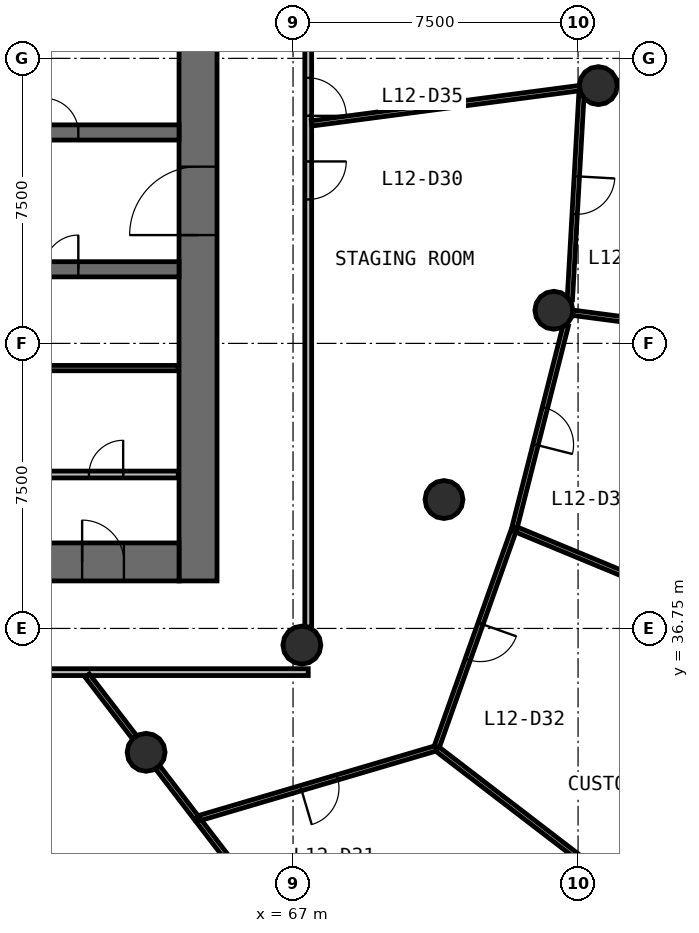
"""IFC4 building model, lengths in metres.
Left out: names, types, materials, properties, quantities, classifications, styles, units other than length and angle.
Written with IfcOpenShell. Run it as: python <this file> out.ifc"""

import sys

from ifc_helpers import new_model, si_unit, direction, frame, frame_2d, origin, origin_2d, place, context, subcontext, project, spatial, rectangle, circle, extrude, source, transform, mapped, element, fill, save


model = new_model("IFC4")
c1 = context("Model", 3, precision=1e-05, world=origin(), true_north=direction((0.0, 1.0)))
c2 = subcontext(c1, "Body", "Model", "MODEL_VIEW")
j1 = project(units=[si_unit("LENGTHUNIT", "METRE"), si_unit("PLANEANGLEUNIT", "RADIAN")], contexts=[c1])
p1 = place(None, origin())
s1 = spatial("IfcSite", under=j1, at=p1, CompositionType="ELEMENT")
p2 = place(p1, origin())
s2 = spatial("IfcBuilding", under=s1, at=p2, CompositionType="ELEMENT")
p3 = place(p2, frame((0.0, 0.0, 53.4)))
s3 = spatial("IfcBuildingStorey", under=s2, at=p3, CompositionType="ELEMENT", Elevation=53.4)
p4 = place(p3, frame((64.5, 38.0, 0.0), z_axis=(0.0, 0.0, 1.0), x_axis=(0.0, 1.0, 0.0)))
e1 = element("IfcWall", 1, at=p4, inside=s3, PredefinedType="SHEAR", context=c2, shape_type="SweptSolid", body=[
    extrude(rectangle(XDim=20.0, YDim=1.0, at=frame_2d((10.0, 0.0))), origin(), (0.0, 0.0, 1.0), 4.4),
])
p5 = place(p4, frame((9.1, 0.0, 0.0)))
e2 = element("IfcOpeningElement", 2, at=p5, cuts=e1, PredefinedType="OPENING", context=c2, shape_type="SweptSolid", body=[
    extrude(rectangle(XDim=1.8, YDim=2.1, at=frame_2d((0.9, 1.05))), frame((0.0, 0.51, 0.0), z_axis=(0.0, -1.0, 0.0), x_axis=(1.0, 0.0, 0.0)), (0.0, 0.0, 1.0), 1.02),
])
p6 = place(p3, frame((40.0, 38.5, 0.0), z_axis=(0.0, 0.0, 1.0), x_axis=(1.0, 0.0, 0.0)))
e3 = element("IfcWall", 3, at=p6, inside=s3, PredefinedType="SHEAR", context=c2, shape_type="SweptSolid", body=[
    extrude(rectangle(XDim=24.0, YDim=1.0, at=frame_2d((12.0, 0.0))), origin(), (0.0, 0.0, 1.0), 4.4),
])
p7 = place(p6, frame((21.45, 0.0, 0.0)))
e4 = element("IfcOpeningElement", 4, at=p7, cuts=e3, PredefinedType="OPENING", context=c2, shape_type="SweptSolid", body=[
    extrude(rectangle(XDim=1.1, YDim=2.1, at=frame_2d((0.55, 1.05))), frame((0.0, 0.51, 0.0), z_axis=(0.0, -1.0, 0.0), x_axis=(1.0, 0.0, 0.0)), (0.0, 0.0, 1.0), 1.02),
])
p8 = place(p6, frame((1.95, 0.0, 0.0)))
e5 = element("IfcOpeningElement", 5, at=p8, cuts=e3, PredefinedType="OPENING", context=c2, shape_type="SweptSolid", body=[
    extrude(rectangle(XDim=1.1, YDim=2.1, at=frame_2d((0.55, 1.05))), frame((0.0, 0.51, 0.0), z_axis=(0.0, -1.0, 0.0), x_axis=(1.0, 0.0, 0.0)), (0.0, 0.0, 1.0), 1.02),
])
p9 = place(p3, frame((40.0, 49.8, 0.0), z_axis=(0.0, 0.0, 1.0), x_axis=(1.0, 0.0, 0.0)))
e6 = element("IfcWall", 6, at=p9, inside=s3, PredefinedType="SHEAR", context=c2, shape_type="SweptSolid", body=[
    extrude(rectangle(XDim=24.0, YDim=0.4, at=frame_2d((12.0, 0.0))), origin(), (0.0, 0.0, 1.0), 4.4),
])
p10 = place(p9, frame((4.5, 0.0, 0.0)))
e7 = element("IfcOpeningElement", 7, at=p10, cuts=e6, PredefinedType="OPENING", context=c2, shape_type="SweptSolid", body=[
    extrude(rectangle(XDim=1.1, YDim=2.1, at=frame_2d((0.55, 1.05))), frame((0.0, 0.21, 0.0), z_axis=(0.0, -1.0, 0.0), x_axis=(1.0, 0.0, 0.0)), (0.0, 0.0, 1.0), 0.42),
])
p11 = place(p9, frame((7.0, 0.0, 0.0)))
e8 = element("IfcOpeningElement", 8, at=p11, cuts=e6, PredefinedType="OPENING", context=c2, shape_type="SweptSolid", body=[
    extrude(rectangle(XDim=1.1, YDim=2.1, at=frame_2d((0.55, 1.05))), frame((0.0, 0.21, 0.0), z_axis=(0.0, -1.0, 0.0), x_axis=(1.0, 0.0, 0.0)), (0.0, 0.0, 1.0), 0.42),
])
p12 = place(p9, frame((9.5, 0.0, 0.0)))
e9 = element("IfcOpeningElement", 9, at=p12, cuts=e6, PredefinedType="OPENING", context=c2, shape_type="SweptSolid", body=[
    extrude(rectangle(XDim=1.1, YDim=2.1, at=frame_2d((0.55, 1.05))), frame((0.0, 0.21, 0.0), z_axis=(0.0, -1.0, 0.0), x_axis=(1.0, 0.0, 0.0)), (0.0, 0.0, 1.0), 0.42),
])
p13 = place(p9, frame((0.9, 0.0, 0.0)))
e10 = element("IfcOpeningElement", 10, at=p13, cuts=e6, PredefinedType="OPENING", context=c2, shape_type="SweptSolid", body=[
    extrude(rectangle(XDim=1.8, YDim=2.4, at=frame_2d((0.9, 1.2))), frame((0.0, 0.21, 0.0), z_axis=(0.0, -1.0, 0.0), x_axis=(1.0, 0.0, 0.0)), (0.0, 0.0, 1.0), 0.42),
])
p14 = place(p9, frame((20.45, 0.0, 0.0)))
e11 = element("IfcOpeningElement", 11, at=p14, cuts=e6, PredefinedType="OPENING", context=c2, shape_type="SweptSolid", body=[
    extrude(rectangle(XDim=0.9, YDim=2.1, at=frame_2d((0.45, 1.05))), frame((0.0, 0.21, 0.0), z_axis=(0.0, -1.0, 0.0), x_axis=(1.0, 0.0, 0.0)), (0.0, 0.0, 1.0), 0.42),
])
p15 = place(p9, frame((11.65, 0.0, 0.0)))
e12 = element("IfcOpeningElement", 12, at=p15, cuts=e6, PredefinedType="OPENING", context=c2, shape_type="SweptSolid", body=[
    extrude(rectangle(XDim=0.9, YDim=2.1, at=frame_2d((0.45, 1.05))), frame((0.0, 0.21, 0.0), z_axis=(0.0, -1.0, 0.0), x_axis=(1.0, 0.0, 0.0)), (0.0, 0.0, 1.0), 0.42),
])
p16 = place(p3, frame((40.0, 46.2, 0.0), z_axis=(0.0, 0.0, 1.0), x_axis=(1.0, 0.0, 0.0)))
e13 = element("IfcWall", 13, at=p16, inside=s3, PredefinedType="SHEAR", context=c2, shape_type="SweptSolid", body=[
    extrude(rectangle(XDim=24.0, YDim=0.4, at=frame_2d((12.0, 0.0))), origin(), (0.0, 0.0, 1.0), 4.4),
])
p17 = place(p16, frame((4.5, 0.0, 0.0)))
e14 = element("IfcOpeningElement", 14, at=p17, cuts=e13, PredefinedType="OPENING", context=c2, shape_type="SweptSolid", body=[
    extrude(rectangle(XDim=1.1, YDim=2.1, at=frame_2d((0.55, 1.05))), frame((0.0, 0.21, 0.0), z_axis=(0.0, -1.0, 0.0), x_axis=(1.0, 0.0, 0.0)), (0.0, 0.0, 1.0), 0.42),
])
p18 = place(p16, frame((7.0, 0.0, 0.0)))
e15 = element("IfcOpeningElement", 15, at=p18, cuts=e13, PredefinedType="OPENING", context=c2, shape_type="SweptSolid", body=[
    extrude(rectangle(XDim=1.1, YDim=2.1, at=frame_2d((0.55, 1.05))), frame((0.0, 0.21, 0.0), z_axis=(0.0, -1.0, 0.0), x_axis=(1.0, 0.0, 0.0)), (0.0, 0.0, 1.0), 0.42),
])
p19 = place(p16, frame((9.5, 0.0, 0.0)))
e16 = element("IfcOpeningElement", 16, at=p19, cuts=e13, PredefinedType="OPENING", context=c2, shape_type="SweptSolid", body=[
    extrude(rectangle(XDim=1.1, YDim=2.1, at=frame_2d((0.55, 1.05))), frame((0.0, 0.21, 0.0), z_axis=(0.0, -1.0, 0.0), x_axis=(1.0, 0.0, 0.0)), (0.0, 0.0, 1.0), 0.42),
])
p20 = place(p16, frame((20.45, 0.0, 0.0)))
e17 = element("IfcOpeningElement", 17, at=p20, cuts=e13, PredefinedType="OPENING", context=c2, shape_type="SweptSolid", body=[
    extrude(rectangle(XDim=0.9, YDim=2.1, at=frame_2d((0.45, 1.05))), frame((0.0, 0.21, 0.0), z_axis=(0.0, -1.0, 0.0), x_axis=(1.0, 0.0, 0.0)), (0.0, 0.0, 1.0), 0.42),
])
p21 = place(p16, frame((2.65, 0.0, 0.0)))
e18 = element("IfcOpeningElement", 18, at=p21, cuts=e13, PredefinedType="OPENING", context=c2, shape_type="SweptSolid", body=[
    extrude(rectangle(XDim=0.9, YDim=2.1, at=frame_2d((0.45, 1.05))), frame((0.0, 0.21, 0.0), z_axis=(0.0, -1.0, 0.0), x_axis=(1.0, 0.0, 0.0)), (0.0, 0.0, 1.0), 0.42),
])
p22 = place(p16, frame((11.65, 0.0, 0.0)))
e19 = element("IfcOpeningElement", 19, at=p22, cuts=e13, PredefinedType="OPENING", context=c2, shape_type="SweptSolid", body=[
    extrude(rectangle(XDim=0.9, YDim=2.1, at=frame_2d((0.45, 1.05))), frame((0.0, 0.21, 0.0), z_axis=(0.0, -1.0, 0.0), x_axis=(1.0, 0.0, 0.0)), (0.0, 0.0, 1.0), 0.42),
])
m1 = source(origin(), c2, "Body", "SweptSolid", [
    extrude(circle(Radius=0.5, at=origin_2d()), origin(), (0.0, 0.0, 1.0), 4.4),
])
for number, where, z_axis, x_axis in (
    (20, (75.034, 51.032, 0.0), (0.0, 0.0, 1.0), (1.0, 0.0, 0.0)),
    (21, (63.134, 33.49, 0.0), (0.0, 0.0, 1.0), (1.0, 0.0, 0.0)),
    (22, (67.232, 36.312, 0.0), (0.0, 0.0, 1.0), (1.0, 0.0, 0.0)),
    (23, (70.972, 40.141, 0.0), (0.0, 0.0, 1.0), (1.0, 0.0, 0.0)),
    (24, (73.863, 45.122, 0.0), (0.0, 0.0, 1.0), (1.0, 0.0, 0.0)),
):
    element("IfcColumn", number, at=place(p3, frame(where, z_axis=z_axis, x_axis=x_axis)), inside=s3, PredefinedType="COLUMN", context=c2, shape_type="MappedRepresentation", body=[
        mapped(m1, transform((0.0, 0.0, 0.0), scale=1.0)),
    ])
p23 = place(p3, frame((67.4, 35.6, 0.0), z_axis=(0.0, 0.0, 1.0), x_axis=(-1.0, 0.0, 0.0)))
e25 = element("IfcWall", 25, at=p23, inside=s3, PredefinedType="PARTITIONING", context=c2, shape_type="SweptSolid", body=[
    extrude(rectangle(XDim=30.8, YDim=0.18, at=frame_2d((15.4, 0.0))), origin(), (0.0, 0.0, 1.0), 3.05),
])
p24 = place(p23, frame((27.45, 0.0, 0.0)))
e26 = element("IfcOpeningElement", 26, at=p24, cuts=e25, PredefinedType="OPENING", context=c2, shape_type="SweptSolid", body=[
    extrude(rectangle(XDim=0.9, YDim=2.1, at=frame_2d((0.45, 1.05))), frame((0.0, 0.1, 0.0), z_axis=(0.0, -1.0, 0.0), x_axis=(1.0, 0.0, 0.0)), (0.0, 0.0, 1.0), 0.2),
])
p25 = place(p23, frame((23.85, 0.0, 0.0)))
e27 = element("IfcOpeningElement", 27, at=p25, cuts=e25, PredefinedType="OPENING", context=c2, shape_type="SweptSolid", body=[
    extrude(rectangle(XDim=0.9, YDim=2.1, at=frame_2d((0.45, 1.05))), frame((0.0, 0.1, 0.0), z_axis=(0.0, -1.0, 0.0), x_axis=(1.0, 0.0, 0.0)), (0.0, 0.0, 1.0), 0.2),
])
p26 = place(p23, frame((20.85, 0.0, 0.0)))
e28 = element("IfcOpeningElement", 28, at=p26, cuts=e25, PredefinedType="OPENING", context=c2, shape_type="SweptSolid", body=[
    extrude(rectangle(XDim=0.9, YDim=2.1, at=frame_2d((0.45, 1.05))), frame((0.0, 0.1, 0.0), z_axis=(0.0, -1.0, 0.0), x_axis=(1.0, 0.0, 0.0)), (0.0, 0.0, 1.0), 0.2),
])
p27 = place(p23, frame((14.95, 0.0, 0.0)))
e29 = element("IfcOpeningElement", 29, at=p27, cuts=e25, PredefinedType="OPENING", context=c2, shape_type="SweptSolid", body=[
    extrude(rectangle(XDim=1.0, YDim=2.1, at=frame_2d((0.5, 1.05))), frame((0.0, 0.1, 0.0), z_axis=(0.0, -1.0, 0.0), x_axis=(1.0, 0.0, 0.0)), (0.0, 0.0, 1.0), 0.2),
])
p28 = place(p3, frame((67.4, 60.37, 0.0), z_axis=(0.0, 0.0, 1.0), x_axis=(0.0, -1.0, 0.0)))
e30 = element("IfcWall", 30, at=p28, inside=s3, PredefinedType="PARTITIONING", context=c2, shape_type="SweptSolid", body=[
    extrude(rectangle(XDim=23.583, YDim=0.18, at=frame_2d((11.791, 0.0))), origin(), (0.0, 0.0, 1.0), 3.05),
])
p29 = place(p28, frame((11.333, 0.0, 0.0)))
e31 = element("IfcOpeningElement", 31, at=p29, cuts=e30, PredefinedType="OPENING", context=c2, shape_type="SweptSolid", body=[
    extrude(rectangle(XDim=1.0, YDim=2.1, at=frame_2d((0.5, 1.05))), frame((0.0, 0.1, 0.0), z_axis=(0.0, -1.0, 0.0), x_axis=(1.0, 0.0, 0.0)), (0.0, 0.0, 1.0), 0.2),
])
p30 = place(p28, frame((9.133, 0.0, 0.0)))
e32 = element("IfcOpeningElement", 32, at=p30, cuts=e30, PredefinedType="OPENING", context=c2, shape_type="SweptSolid", body=[
    extrude(rectangle(XDim=1.0, YDim=2.1, at=frame_2d((0.5, 1.05))), frame((0.0, 0.1, 0.0), z_axis=(0.0, -1.0, 0.0), x_axis=(1.0, 0.0, 0.0)), (0.0, 0.0, 1.0), 0.2),
])
p31 = place(p3, frame((60.23, 40.8, 0.0), z_axis=(0.0, 0.0, 1.0), x_axis=(1.0, 0.0, 0.0)))
e33 = element("IfcWall", 33, at=p31, inside=s3, PredefinedType="PARTITIONING", context=c2, shape_type="SweptSolid", body=[
    extrude(rectangle(XDim=3.75, YDim=0.18, at=frame_2d((1.875, 0.0))), origin(), (0.0, 0.0, 1.0), 3.95),
])
p32 = place(p31, frame((1.4, 0.0, 0.0)))
e34 = element("IfcOpeningElement", 34, at=p32, cuts=e33, PredefinedType="OPENING", context=c2, shape_type="SweptSolid", body=[
    extrude(rectangle(XDim=0.9, YDim=2.1, at=frame_2d((0.45, 1.05))), frame((0.0, 0.1, 0.0), z_axis=(0.0, -1.0, 0.0), x_axis=(1.0, 0.0, 0.0)), (0.0, 0.0, 1.0), 0.2),
])
p33 = place(p3, frame((75.534, 51.098, 0.0), z_axis=(0.0, 0.0, 1.0), x_axis=(0.991446586451, 0.130513088287, 0.0)))
e35 = element("IfcWall", 35, at=p33, inside=s3, PredefinedType="PARTITIONING", context=c2, shape_type="SweptSolid", body=[
    extrude(rectangle(XDim=11.86, YDim=0.14, at=frame_2d((5.93, 0.0))), origin(), (0.0, 0.0, 1.0), 3.05),
])
p34 = place(p3, frame((74.363, 45.056, 0.0), z_axis=(0.0, 0.0, 1.0), x_axis=(0.991443306772, -0.130538000051, 0.0)))
e36 = element("IfcWall", 36, at=p34, inside=s3, PredefinedType="PARTITIONING", context=c2, shape_type="SweptSolid", body=[
    extrude(rectangle(XDim=11.195, YDim=0.14, at=frame_2d((5.598, 0.0))), origin(), (0.0, 0.0, 1.0), 3.05),
])
p35 = place(p3, frame((72.821, 39.375, 0.0), z_axis=(0.0, 0.0, 1.0), x_axis=(0.923875203153, -0.382693884193, 0.0)))
e37 = element("IfcWall", 37, at=p35, inside=s3, PredefinedType="PARTITIONING", context=c2, shape_type="SweptSolid", body=[
    extrude(rectangle(XDim=8.845, YDim=0.14, at=frame_2d((4.423, 0.0))), origin(), (0.0, 0.0, 1.0), 3.05),
])
p36 = place(p3, frame((67.49, 50.039, 0.0), z_axis=(0.0, 0.0, 1.0), x_axis=(0.99144622305, 0.130515848849, 0.0)))
e38 = element("IfcWall", 38, at=p36, inside=s3, PredefinedType="PARTITIONING", context=c2, shape_type="SweptSolid", body=[
    extrude(rectangle(XDim=7.104, YDim=0.14, at=frame_2d((3.552, 0.0))), origin(), (0.0, 0.0, 1.0), 3.05),
])
p37 = place(p3, frame((70.769, 33.598, 0.0), z_axis=(0.0, 0.0, 1.0), x_axis=(-0.959164410747, -0.282849134974, 0.0)))
e39 = element("IfcWall", 39, at=p37, inside=s3, PredefinedType="PARTITIONING", context=c2, shape_type="SweptSolid", body=[
    extrude(rectangle(XDim=6.562, YDim=0.14, at=frame_2d((3.281, 0.0))), origin(), (0.0, 0.0, 1.0), 3.05),
])
p38 = place(p37, frame((2.712, 0.0, 0.0)))
e40 = element("IfcOpeningElement", 40, at=p38, cuts=e39, PredefinedType="OPENING", context=c2, shape_type="SweptSolid", body=[
    extrude(rectangle(XDim=1.0, YDim=2.1, at=frame_2d((0.5, 1.05))), frame((0.0, 0.08, 0.0), z_axis=(0.0, -1.0, 0.0), x_axis=(1.0, 0.0, 0.0)), (0.0, 0.0, 1.0), 0.16),
])
p39 = place(p3, frame((72.798, 39.309, 0.0), z_axis=(0.0, 0.0, 1.0), x_axis=(-0.334820387554, -0.942281968456, 0.0)))
e41 = element("IfcWall", 41, at=p39, inside=s3, PredefinedType="PARTITIONING", context=c2, shape_type="SweptSolid", body=[
    extrude(rectangle(XDim=6.031, YDim=0.14, at=frame_2d((3.016, 0.0))), origin(), (0.0, 0.0, 1.0), 3.05),
])
p40 = place(p39, frame((2.581, 0.0, 0.0)))
e42 = element("IfcOpeningElement", 42, at=p40, cuts=e41, PredefinedType="OPENING", context=c2, shape_type="SweptSolid", body=[
    extrude(rectangle(XDim=1.0, YDim=2.1, at=frame_2d((0.5, 1.05))), frame((0.0, 0.08, 0.0), z_axis=(0.0, -1.0, 0.0), x_axis=(1.0, 0.0, 0.0)), (0.0, 0.0, 1.0), 0.16),
])
p41 = place(p3, frame((70.793, 33.58, 0.0), z_axis=(0.0, 0.0, 1.0), x_axis=(0.793369467151, -0.6087404115, 0.0)))
e43 = element("IfcWall", 43, at=p41, inside=s3, PredefinedType="PARTITIONING", context=c2, shape_type="SweptSolid", body=[
    extrude(rectangle(XDim=5.608, YDim=0.14, at=frame_2d((2.804, 0.0))), origin(), (0.0, 0.0, 1.0), 3.05),
])
p42 = place(p3, frame((74.178, 44.727, 0.0), z_axis=(0.0, 0.0, 1.0), x_axis=(-0.245735490717, -0.969336922129, 0.0)))
e44 = element("IfcWall", 44, at=p42, inside=s3, PredefinedType="PARTITIONING", context=c2, shape_type="SweptSolid", body=[
    extrude(rectangle(XDim=5.491, YDim=0.14, at=frame_2d((2.746, 0.0))), origin(), (0.0, 0.0, 1.0), 3.05),
])
p43 = place(p42, frame((2.241, 0.0, 0.0)))
e45 = element("IfcOpeningElement", 45, at=p43, cuts=e44, PredefinedType="OPENING", context=c2, shape_type="SweptSolid", body=[
    extrude(rectangle(XDim=1.0, YDim=2.1, at=frame_2d((0.5, 1.05))), frame((0.0, 0.08, 0.0), z_axis=(0.0, -1.0, 0.0), x_axis=(1.0, 0.0, 0.0)), (0.0, 0.0, 1.0), 0.16),
])
p44 = place(p3, frame((74.589, 50.793, 0.0), z_axis=(0.0, 0.0, 1.0), x_axis=(-0.056551571082, -0.998399679391, 0.0)))
e46 = element("IfcWall", 46, at=p44, inside=s3, PredefinedType="PARTITIONING", context=c2, shape_type="SweptSolid", body=[
    extrude(rectangle(XDim=5.401, YDim=0.14, at=frame_2d((2.7, 0.0))), origin(), (0.0, 0.0, 1.0), 3.05),
])
p45 = place(p44, frame((2.151, 0.0, 0.0)))
e47 = element("IfcOpeningElement", 47, at=p45, cuts=e46, PredefinedType="OPENING", context=c2, shape_type="SweptSolid", body=[
    extrude(rectangle(XDim=1.0, YDim=2.1, at=frame_2d((0.5, 1.05))), frame((0.0, 0.08, 0.0), z_axis=(0.0, -1.0, 0.0), x_axis=(1.0, 0.0, 0.0)), (0.0, 0.0, 1.0), 0.16),
])
p46 = place(p3, frame((60.23, 43.6, 0.0), z_axis=(0.0, 0.0, 1.0), x_axis=(1.0, 0.0, 0.0)))
e48 = element("IfcWall", 48, at=p46, inside=s3, PredefinedType="PARTITIONING", context=c2, shape_type="SweptSolid", body=[
    extrude(rectangle(XDim=3.75, YDim=0.14, at=frame_2d((1.875, 0.0))), origin(), (0.0, 0.0, 1.0), 3.05),
])
p47 = place(p3, frame((64.521, 31.683, 0.0), z_axis=(0.0, 0.0, 1.0), x_axis=(0.608761578312, -0.793353225727, 0.0)))
e49 = element("IfcWall", 49, at=p47, inside=s3, PredefinedType="PARTITIONING", context=c2, shape_type="SweptSolid", body=[
    extrude(rectangle(XDim=2.748, YDim=0.14, at=frame_2d((1.374, 0.0))), origin(), (0.0, 0.0, 1.0), 3.05),
])
p48 = place(p3, frame((61.584, 35.51, 0.0), z_axis=(0.0, 0.0, 1.0), x_axis=(0.608727763541, -0.793379171578, 0.0)))
e50 = element("IfcWall", 50, at=p48, inside=s3, PredefinedType="PARTITIONING", context=c2, shape_type="SweptSolid", body=[
    extrude(rectangle(XDim=2.042, YDim=0.14, at=frame_2d((1.021, 0.0))), origin(), (0.0, 0.0, 1.0), 3.05),
])
p49 = place(p3, frame((63.441, 33.09, 0.0), z_axis=(0.0, 0.0, 1.0), x_axis=(0.608812360851, -0.793314256317, 0.0)))
e51 = element("IfcWall", 51, at=p49, inside=s3, PredefinedType="PARTITIONING", context=c2, shape_type="SweptSolid", body=[
    extrude(rectangle(XDim=1.669, YDim=0.14, at=frame_2d((0.834, 0.0))), origin(), (0.0, 0.0, 1.0), 3.05),
])
m2 = source(origin(), c2, "Body", "SweptSolid", [
    extrude(rectangle(XDim=1.8, YDim=2.1, at=frame_2d((0.9, 1.05))), frame((0.0, 0.025, 0.0), z_axis=(0.0, -1.0, 0.0), x_axis=(1.0, 0.0, 0.0)), (0.0, 0.0, 1.0), 0.05),
])
p50 = place(p5, origin())
e52 = element("IfcDoor", 52, at=p50, inside=s3, OperationType="SINGLE_SWING_LEFT", PredefinedType="DOOR", context=c2, shape_type="MappedRepresentation", body=[
    mapped(m2, transform((0.0, 0.0, 0.0), scale=1.0)),
])
fill(e2, e52)
m3 = source(origin(), c2, "Body", "SweptSolid", [
    extrude(rectangle(XDim=1.1, YDim=2.1, at=frame_2d((0.55, 1.05))), frame((0.0, 0.025, 0.0), z_axis=(0.0, -1.0, 0.0), x_axis=(1.0, 0.0, 0.0)), (0.0, 0.0, 1.0), 0.05),
])
p51 = place(p7, origin())
e53 = element("IfcDoor", 53, at=p51, inside=s3, OperationType="SINGLE_SWING_LEFT", PredefinedType="DOOR", context=c2, shape_type="MappedRepresentation", body=[
    mapped(m3, transform((0.0, 0.0, 0.0), scale=1.0)),
])
fill(e4, e53)
m4 = source(origin(), c2, "Body", "SweptSolid", [
    extrude(rectangle(XDim=1.0, YDim=2.1, at=frame_2d((0.5, 1.05))), frame((0.0, 0.025, 0.0), z_axis=(0.0, -1.0, 0.0), x_axis=(1.0, 0.0, 0.0)), (0.0, 0.0, 1.0), 0.05),
])
p52 = place(p29, origin())
e54 = element("IfcDoor", 54, at=p52, inside=s3, OperationType="SINGLE_SWING_LEFT", PredefinedType="DOOR", context=c2, shape_type="MappedRepresentation", body=[
    mapped(m4, transform((0.0, 0.0, 0.0), scale=1.0)),
])
fill(e31, e54)
p53 = place(p38, origin())
e55 = element("IfcDoor", 55, at=p53, inside=s3, OperationType="SINGLE_SWING_RIGHT", PredefinedType="DOOR", context=c2, shape_type="MappedRepresentation", body=[
    mapped(m4, transform((0.0, 0.0, 0.0), scale=1.0)),
])
fill(e40, e55)
p54 = place(p40, origin())
e56 = element("IfcDoor", 56, at=p54, inside=s3, OperationType="SINGLE_SWING_LEFT", PredefinedType="DOOR", context=c2, shape_type="MappedRepresentation", body=[
    mapped(m4, transform((0.0, 0.0, 0.0), scale=1.0)),
])
fill(e42, e56)
p55 = place(p43, origin())
e57 = element("IfcDoor", 57, at=p55, inside=s3, OperationType="SINGLE_SWING_RIGHT", PredefinedType="DOOR", context=c2, shape_type="MappedRepresentation", body=[
    mapped(m4, transform((0.0, 0.0, 0.0), scale=1.0)),
])
fill(e45, e57)
p56 = place(p45, origin())
e58 = element("IfcDoor", 58, at=p56, inside=s3, OperationType="SINGLE_SWING_LEFT", PredefinedType="DOOR", context=c2, shape_type="MappedRepresentation", body=[
    mapped(m4, transform((0.0, 0.0, 0.0), scale=1.0)),
])
fill(e47, e58)
p57 = place(p30, origin())
e59 = element("IfcDoor", 59, at=p57, inside=s3, OperationType="SINGLE_SWING_RIGHT", PredefinedType="DOOR", context=c2, shape_type="MappedRepresentation", body=[
    mapped(m4, transform((0.0, 0.0, 0.0), scale=1.0)),
])
fill(e32, e59)
m5 = source(origin(), c2, "Body", "SweptSolid", [
    extrude(rectangle(XDim=0.9, YDim=2.1, at=frame_2d((0.45, 1.05))), frame((0.0, 0.025, 0.0), z_axis=(0.0, -1.0, 0.0), x_axis=(1.0, 0.0, 0.0)), (0.0, 0.0, 1.0), 0.05),
])
p58 = place(p20, origin())
e60 = element("IfcDoor", 60, at=p58, inside=s3, OperationType="SINGLE_SWING_RIGHT", PredefinedType="DOOR", context=c2, shape_type="MappedRepresentation", body=[
    mapped(m5, transform((0.0, 0.0, 0.0), scale=1.0)),
])
fill(e17, e60)
p59 = place(p14, origin())
e61 = element("IfcDoor", 61, at=p59, inside=s3, OperationType="SINGLE_SWING_LEFT", PredefinedType="DOOR", context=c2, shape_type="MappedRepresentation", body=[
    mapped(m5, transform((0.0, 0.0, 0.0), scale=1.0)),
])
fill(e11, e61)
p60 = place(p32, origin())
e62 = element("IfcDoor", 62, at=p60, inside=s3, OperationType="SINGLE_SWING_RIGHT", PredefinedType="DOOR", context=c2, shape_type="MappedRepresentation", body=[
    mapped(m5, transform((0.0, 0.0, 0.0), scale=1.0)),
])
fill(e34, e62)
save(model, sys.argv[1])
